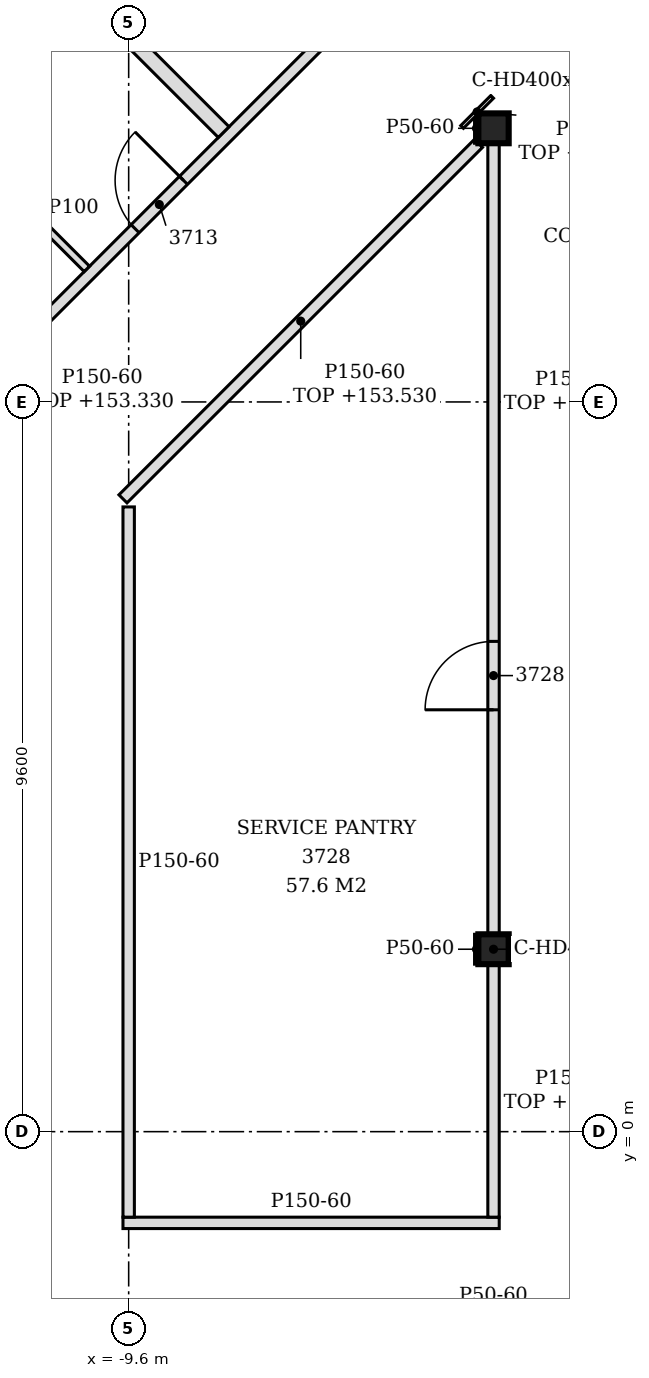
"""IFC4 building model, lengths in metres.
Left out: names, types, materials, properties, quantities, classifications, styles, units other than length and angle.
Written with IfcOpenShell. Run it as: python <this file> out.ifc"""

import sys

from ifc_helpers import new_model, si_unit, direction, frame, frame_2d, origin, origin_2d, place, context, subcontext, project, spatial, polyline, rectangle, i_section, outline, extrude, element, fill, save


model = new_model("IFC4")
c1 = context("Model", 3, precision=1e-05, world=origin(), true_north=direction((0.0, 1.0)))
c2 = subcontext(c1, "Body", "Model", "MODEL_VIEW")
j1 = project(units=[si_unit("LENGTHUNIT", "METRE"), si_unit("PLANEANGLEUNIT", "RADIAN")], contexts=[c1])
p1 = place(None, origin())
s1 = spatial("IfcSite", under=j1, at=p1, CompositionType="ELEMENT")
p2 = place(p1, origin())
s2 = spatial("IfcBuilding", under=s1, at=p2, CompositionType="ELEMENT")
p3 = place(p2, frame((0.0, 0.0, 150.6)))
s3 = spatial("IfcBuildingStorey", under=s2, at=p3, CompositionType="ELEMENT", Elevation=150.6)
for number, where, z_axis, x_axis in (
    (1, (-4.8, 2.4, -0.15), (0.0, 0.0, 1.0), (1.0, 0.0, 0.0)),
    (2, (-4.8, 13.2, -0.15), (0.0, 0.0, 1.0), (1.0, 0.0, 0.0)),
):
    element("IfcColumn", number, at=place(p3, frame(where, z_axis=z_axis, x_axis=x_axis)), inside=s3, PredefinedType="COLUMN", context=c2, shape_type="SweptSolid", body=[
        extrude(i_section(OverallWidth=0.399, OverallDepth=0.393, WebThickness=0.023, FlangeThickness=0.037, FilletRadius=0.015, at=origin_2d()), origin(), (0.0, 0.0, 1.0), 3.6),
    ])
p4 = place(p3, frame((-9.675, -1.2, 0.0), z_axis=(0.0, 0.0, 1.0), x_axis=(1.0, 0.0, 0.0)))
e3 = element("IfcWall", 3, at=p4, inside=s3, PredefinedType="PARTITIONING", context=c2, shape_type="SweptSolid", body=[
    extrude(outline(polyline([(0.0, 0.0), (4.95, 0.0), (4.95, 2.83), (4.725, 2.83), (4.723, 3.45), (0.0, 3.45), (0.0, 0.0)])), frame((0.0, 0.075, 0.0), z_axis=(0.0, -1.0, 0.0), x_axis=(1.0, 0.0, 0.0)), (0.0, 0.0, 1.0), 0.15),
])
p5 = place(p3, frame((-9.6, -1.125, 0.0), z_axis=(0.0, 0.0, 1.0), x_axis=(0.0, 1.0, 0.0)))
e4 = element("IfcWall", 4, at=p5, inside=s3, PredefinedType="PARTITIONING", context=c2, shape_type="SweptSolid", body=[
    extrude(outline(polyline([(0.0, 0.0), (9.344, 0.0), (9.344, 3.45), (6.025, 3.45), (6.023, 2.93), (5.825, 2.93), (5.823, 3.45), (1.225, 3.45), (1.223, 2.93), (1.025, 2.93), (1.023, 3.45), (0.0, 3.45), (0.0, 0.0)])), frame((0.0, 0.075, 0.0), z_axis=(0.0, -1.0, 0.0), x_axis=(1.0, 0.0, 0.0)), (0.0, 0.0, 1.0), 0.15),
])
p6 = place(p3, frame((-4.8, -1.125, 0.0), z_axis=(0.0, 0.0, 1.0), x_axis=(0.0, 1.0, 0.0)))
e5 = element("IfcWall", 5, at=p6, inside=s3, PredefinedType="PARTITIONING", context=c2, shape_type="SweptSolid", body=[
    extrude(rectangle(XDim=3.329, YDim=0.15, at=frame_2d((1.664, 0.0))), origin(), (0.0, 0.0, 1.0), 2.83),
])
p7 = place(p3, frame((-4.8, 2.596, 0.0), z_axis=(0.0, 0.0, 1.0), x_axis=(0.0, 1.0, 0.0)))
e6 = element("IfcWall", 6, at=p7, inside=s3, PredefinedType="PARTITIONING", context=c2, shape_type="SweptSolid", body=[
    extrude(rectangle(XDim=10.407, YDim=0.15, at=frame_2d((5.204, 0.0))), origin(), (0.0, 0.0, 1.0), 2.83),
])
p8 = place(p7, frame((2.954, 0.0, 0.0)))
e7 = element("IfcOpeningElement", 7, at=p8, cuts=e6, PredefinedType="OPENING", context=c2, shape_type="SweptSolid", body=[
    extrude(rectangle(XDim=0.9, YDim=2.1, at=frame_2d((0.45, 1.05))), frame((0.0, 0.085, 0.0), z_axis=(0.0, -1.0, 0.0), x_axis=(1.0, 0.0, 0.0)), (0.0, 0.0, 1.0), 0.17),
])
p9 = place(p3, frame((-9.675, 8.325, 0.0), z_axis=(0.0, 0.0, 1.0), x_axis=(0.707106781187, 0.707106781187, 0.0)))
e8 = element("IfcWall", 8, at=p9, inside=s3, PredefinedType="PARTITIONING", context=c2, shape_type="SweptSolid", body=[
    extrude(rectangle(XDim=6.614, YDim=0.15, at=frame_2d((3.307, 0.0))), origin(), (0.0, 0.0, 1.0), 2.93),
])
p10 = place(p3, frame((-12.075, 9.319, 0.0), z_axis=(0.0, 0.0, 1.0), x_axis=(0.707106781187, 0.707106781187, 0.0)))
e9 = element("IfcWall", 9, at=p10, inside=s3, PredefinedType="PARTITIONING", context=c2, shape_type="SweptSolid", body=[
    extrude(rectangle(XDim=13.793, YDim=0.15, at=frame_2d((6.896, 0.0))), origin(), (0.0, 0.0, 1.0), 2.73),
])
p11 = place(p10, frame((11.692, 0.0, 0.0)))
e10 = element("IfcOpeningElement", 10, at=p11, cuts=e9, PredefinedType="OPENING", context=c2, shape_type="SweptSolid", body=[
    extrude(rectangle(XDim=0.9, YDim=2.1, at=frame_2d((0.45, 1.05))), frame((0.0, 0.085, 0.0), z_axis=(0.0, -1.0, 0.0), x_axis=(1.0, 0.0, 0.0)), (0.0, 0.0, 1.0), 0.17),
])
p12 = place(p10, frame((7.376, 0.0, 0.0)))
e11 = element("IfcOpeningElement", 11, at=p12, cuts=e9, PredefinedType="OPENING", context=c2, shape_type="SweptSolid", body=[
    extrude(rectangle(XDim=0.9, YDim=2.1, at=frame_2d((0.45, 1.05))), frame((0.0, 0.085, 0.0), z_axis=(0.0, -1.0, 0.0), x_axis=(1.0, 0.0, 0.0)), (0.0, 0.0, 1.0), 0.17),
])
p13 = place(p10, frame((3.62, 0.0, 0.0)))
e12 = element("IfcOpeningElement", 12, at=p13, cuts=e9, PredefinedType="OPENING", context=c2, shape_type="SweptSolid", body=[
    extrude(rectangle(XDim=0.9, YDim=2.1, at=frame_2d((0.45, 1.05))), frame((0.0, 0.085, 0.0), z_axis=(0.0, -1.0, 0.0), x_axis=(1.0, 0.0, 0.0)), (0.0, 0.0, 1.0), 0.17),
])
p14 = place(p3, frame((-10.15, 11.35, 0.0), z_axis=(0.0, 0.0, 1.0), x_axis=(-0.707160441348, 0.707053116953, 0.0)))
e13 = element("IfcWall", 13, at=p14, inside=s3, PredefinedType="PARTITIONING", context=c2, shape_type="SweptSolid", body=[
    extrude(rectangle(XDim=2.275, YDim=0.1, at=frame_2d((1.137, 0.0))), origin(), (0.0, 0.0, 1.0), 3.45),
])
p15 = place(p3, frame((-8.35, 13.15, 0.0), z_axis=(0.0, 0.0, 1.0), x_axis=(-0.707092030896, 0.707121531169, 0.0)))
e14 = element("IfcWall", 14, at=p15, inside=s3, PredefinedType="PARTITIONING", context=c2, shape_type="SweptSolid", body=[
    extrude(rectangle(XDim=8.276, YDim=0.2, at=frame_2d((4.138, 0.0))), origin(), (0.0, 0.0, 1.0), 2.93),
])
p16 = place(p3, frame((-5.024, 2.204, 0.0), z_axis=(0.0, 0.0, 1.0), x_axis=(0.0, 1.0, 0.0)))
e15 = element("IfcWall", 15, at=p16, inside=s3, PredefinedType="PARTITIONING", context=c2, shape_type="SweptSolid", body=[
    extrude(rectangle(XDim=0.393, YDim=0.05, at=frame_2d((0.196, 0.0))), origin(), (0.0, 0.0, 1.0), 3.45),
])
p17 = place(p3, frame((-5.024, 13.003, 0.0), z_axis=(0.0, 0.0, 1.0), x_axis=(0.0, 1.0, 0.0)))
e16 = element("IfcWall", 16, at=p17, inside=s3, PredefinedType="PARTITIONING", context=c2, shape_type="SweptSolid", body=[
    extrude(rectangle(XDim=0.393, YDim=0.05, at=frame_2d((0.197, 0.0))), origin(), (0.0, 0.0, 1.0), 3.45),
])
p18 = place(p3, frame((-5.214, 13.218, 0.0), z_axis=(0.0, 0.0, 1.0), x_axis=(0.707106781187, 0.707106781187, 0.0)))
e17 = element("IfcWall", 17, at=p18, inside=s3, PredefinedType="PARTITIONING", context=c2, shape_type="SweptSolid", body=[
    extrude(rectangle(XDim=0.56, YDim=0.05, at=frame_2d((0.28, 0.0))), origin(), (0.0, 0.0, 1.0), 2.73),
])
p19 = place(p13, origin())
e18 = element("IfcDoor", 18, at=p19, inside=s3, OperationType="SINGLE_SWING_RIGHT", PredefinedType="DOOR", context=c2, shape_type="SweptSolid", body=[
    extrude(rectangle(XDim=0.9, YDim=2.1, at=frame_2d((0.45, 1.05))), frame((0.0, 0.025, 0.0), z_axis=(0.0, -1.0, 0.0), x_axis=(1.0, 0.0, 0.0)), (0.0, 0.0, 1.0), 0.05),
])
fill(e12, e18)
p20 = place(p8, origin())
e19 = element("IfcDoor", 19, at=p20, inside=s3, OperationType="SINGLE_SWING_LEFT", PredefinedType="DOOR", context=c2, shape_type="SweptSolid", body=[
    extrude(rectangle(XDim=0.9, YDim=2.1, at=frame_2d((0.45, 1.05))), frame((0.0, 0.025, 0.0), z_axis=(0.0, -1.0, 0.0), x_axis=(1.0, 0.0, 0.0)), (0.0, 0.0, 1.0), 0.05),
])
fill(e7, e19)
save(model, sys.argv[1])
